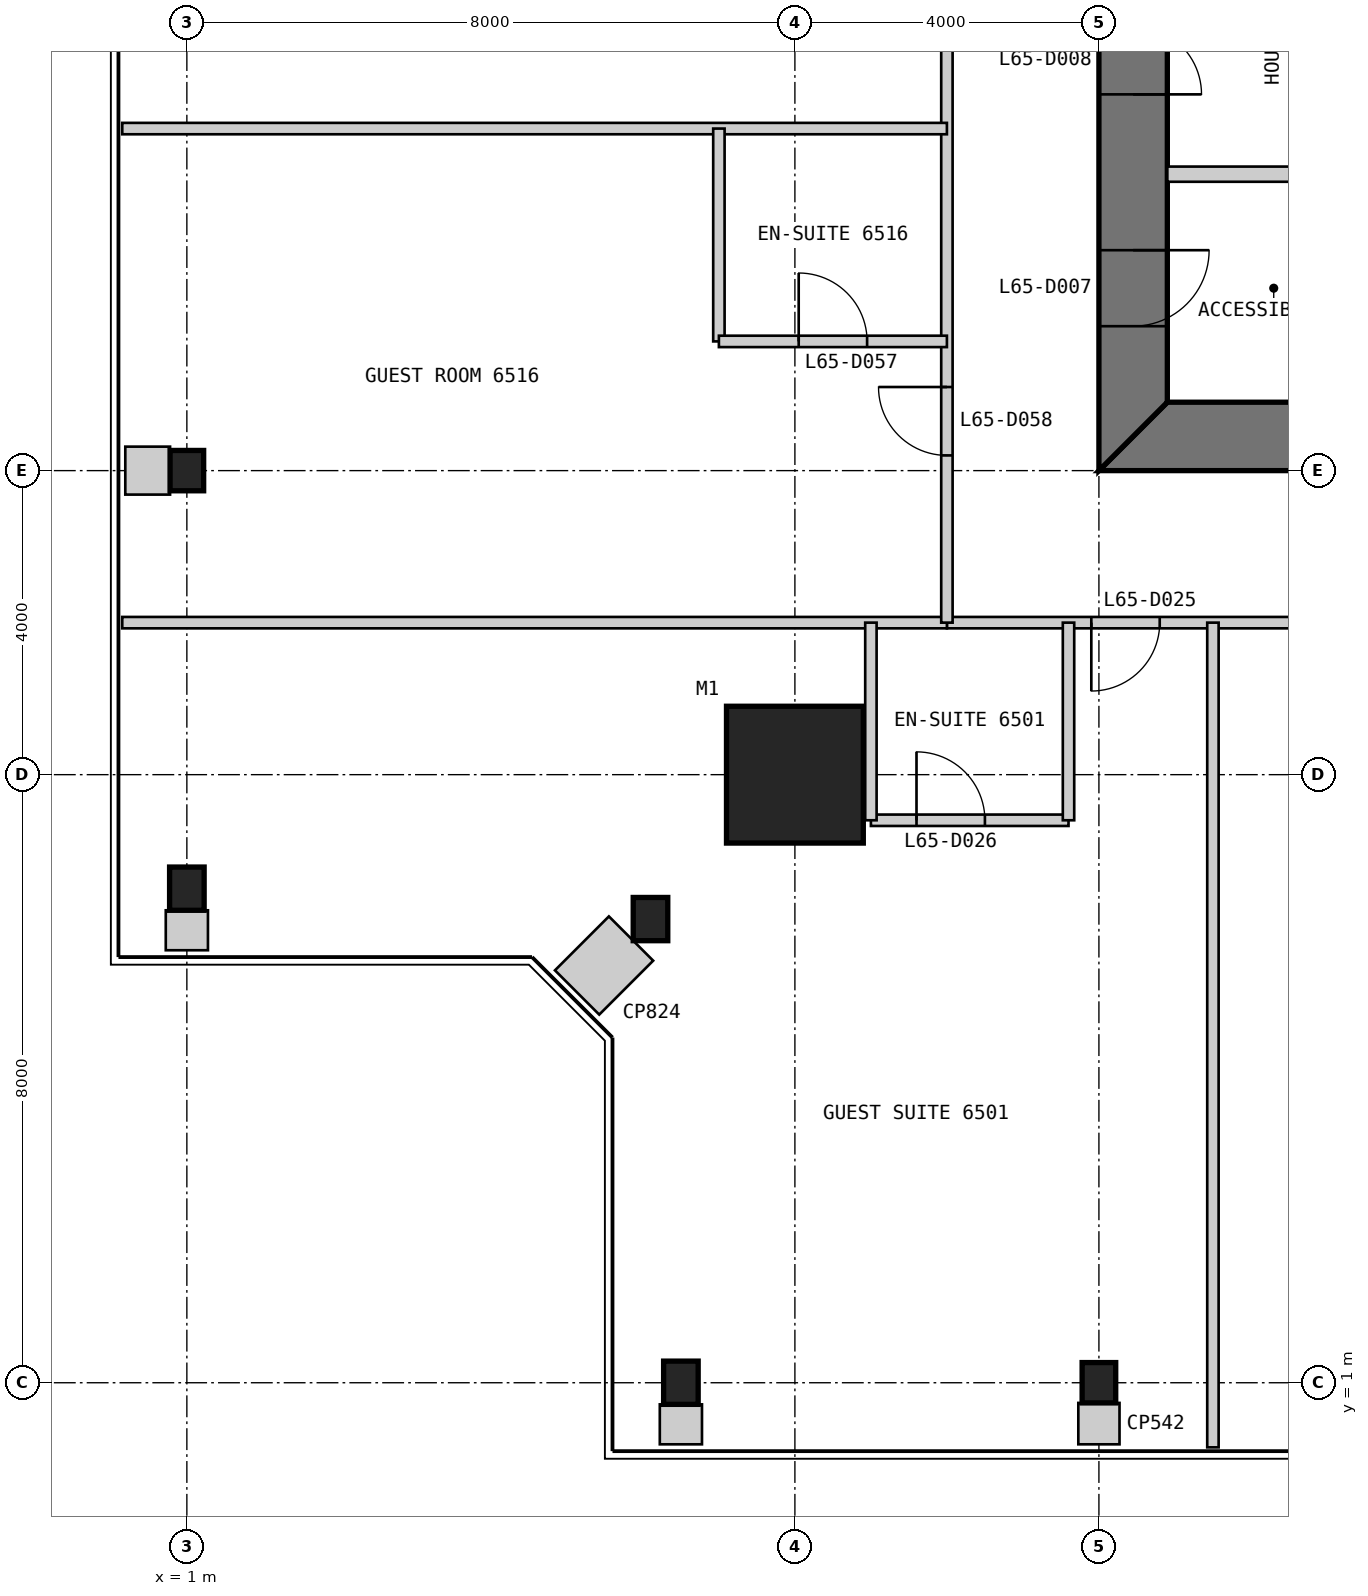
"""IFC4 building model, lengths in metres.
Left out: names, types, materials, properties, quantities, classifications, styles, units other than length and angle.
Written with IfcOpenShell. Run it as: python <this file> out.ifc"""

import sys

from ifc_helpers import new_model, si_unit, direction, frame, frame_2d, origin, origin_2d, place, context, subcontext, project, spatial, polyline, rectangle, i_section, outline, extrude, element, fill, save


model = new_model("IFC4")
c1 = context("Model", 3, precision=1e-05, world=origin(), true_north=direction((0.0, 1.0)))
c2 = subcontext(c1, "Body", "Model", "MODEL_VIEW")
j1 = project(units=[si_unit("LENGTHUNIT", "METRE"), si_unit("PLANEANGLEUNIT", "RADIAN")], contexts=[c1])
p1 = place(None, origin())
s1 = spatial("IfcSite", under=j1, at=p1, CompositionType="ELEMENT")
p2 = place(p1, origin())
s2 = spatial("IfcBuilding", under=s1, at=p2, CompositionType="ELEMENT")
p3 = place(p2, frame((0.0, 0.0, 273.0)))
s3 = spatial("IfcBuildingStorey", under=s2, at=p3, CompositionType="ELEMENT", Elevation=273.0)
p4 = place(p3, frame((9.0, 9.0, 0.0), z_axis=(0.0, 0.0, 1.0), x_axis=(1.0, 0.0, 0.0)))
e1 = element("IfcColumn", 1, at=p4, inside=s3, PredefinedType="COLUMN", context=c2, shape_type="SweptSolid", body=[
    extrude(rectangle(XDim=1.8, YDim=1.8, at=origin_2d()), origin(), (0.0, 0.0, 1.0), 3.4),
])
p5 = place(p3, frame((7.5, 1.0, 0.0), z_axis=(0.0, 0.0, 1.0), x_axis=(1.0, 0.0, 0.0)))
e2 = element("IfcColumn", 2, at=p5, inside=s3, PredefinedType="COLUMN", context=c2, shape_type="SweptSolid", body=[
    extrude(i_section(OverallWidth=0.455, OverallDepth=0.569, WebThickness=0.078, FlangeThickness=0.125, at=origin_2d()), origin(), (0.0, 0.0, 1.0), 3.4),
])
for number, where, z_axis, x_axis in (
    (3, (13.0, 1.0, 0.0), (0.0, 0.0, 1.0), (1.0, 0.0, 0.0)),
    (4, (1.0, 13.0, 0.0), (0.0, 0.0, 1.0), (1.0, 0.0, 0.0)),
):
    element("IfcColumn", number, at=place(p3, frame(where, z_axis=z_axis, x_axis=x_axis)), inside=s3, PredefinedType="COLUMN", context=c2, shape_type="SweptSolid", body=[
        extrude(i_section(OverallWidth=0.442, OverallDepth=0.531, WebThickness=0.066, FlangeThickness=0.106, at=origin_2d()), origin(), (0.0, 0.0, 1.0), 3.4),
    ])
for number, where, z_axis, x_axis in (
    (5, (1.0, 7.5, 0.0), (0.0, 0.0, 1.0), (1.0, 0.0, 0.0)),
    (6, (7.1, 7.1, 0.0), (0.0, 0.0, 1.0), (1.0, 0.0, 0.0)),
):
    element("IfcColumn", number, at=place(p3, frame(where, z_axis=z_axis, x_axis=x_axis)), inside=s3, PredefinedType="COLUMN", context=c2, shape_type="SweptSolid", body=[
        extrude(i_section(OverallWidth=0.455, OverallDepth=0.569, WebThickness=0.078, FlangeThickness=0.125, at=origin_2d()), origin(), (0.0, 0.0, 1.0), 3.4),
    ])
p6 = place(p3, frame((13.0, 13.45, 0.0), z_axis=(0.0, 0.0, 1.0), x_axis=(1.0, 0.0, 0.0)))
e7 = element("IfcWall", 7, at=p6, inside=s3, PredefinedType="SHEAR", context=c2, shape_type="SweptSolid", body=[
    extrude(outline(polyline([(0.0, -0.45), (24.0, -0.45), (23.1, 0.45), (0.9, 0.45), (0.0, -0.45)])), origin(), (0.0, 0.0, 1.0), 3.4),
])
p7 = place(p6, frame((4.9, 0.0, 0.0)))
e8 = element("IfcOpeningElement", 8, at=p7, cuts=e7, PredefinedType="OPENING", context=c2, shape_type="SweptSolid", body=[
    extrude(rectangle(XDim=1.0, YDim=2.2, at=frame_2d((0.5, 1.1))), frame((0.0, 0.46, 0.0), z_axis=(0.0, -1.0, 0.0), x_axis=(1.0, 0.0, 0.0)), (0.0, 0.0, 1.0), 0.92),
])
p8 = place(p6, frame((8.9, 0.0, 0.0)))
e9 = element("IfcOpeningElement", 9, at=p8, cuts=e7, PredefinedType="OPENING", context=c2, shape_type="SweptSolid", body=[
    extrude(rectangle(XDim=1.1, YDim=2.2, at=frame_2d((0.55, 1.1))), frame((0.0, 0.46, 0.0), z_axis=(0.0, -1.0, 0.0), x_axis=(1.0, 0.0, 0.0)), (0.0, 0.0, 1.0), 0.92),
])
p9 = place(p6, frame((15.05, 0.0, 0.0)))
e10 = element("IfcOpeningElement", 10, at=p9, cuts=e7, PredefinedType="OPENING", context=c2, shape_type="SweptSolid", body=[
    extrude(rectangle(XDim=0.9, YDim=2.2, at=frame_2d((0.45, 1.1))), frame((0.0, 0.46, 0.0), z_axis=(0.0, -1.0, 0.0), x_axis=(1.0, 0.0, 0.0)), (0.0, 0.0, 1.0), 0.92),
])
p10 = place(p6, frame((17.9, 0.0, 0.0)))
e11 = element("IfcOpeningElement", 11, at=p10, cuts=e7, PredefinedType="OPENING", context=c2, shape_type="SweptSolid", body=[
    extrude(rectangle(XDim=1.0, YDim=2.2, at=frame_2d((0.5, 1.1))), frame((0.0, 0.46, 0.0), z_axis=(0.0, -1.0, 0.0), x_axis=(1.0, 0.0, 0.0)), (0.0, 0.0, 1.0), 0.92),
])
p11 = place(p6, frame((21.4, 0.0, 0.0)))
e12 = element("IfcOpeningElement", 12, at=p11, cuts=e7, PredefinedType="OPENING", context=c2, shape_type="SweptSolid", body=[
    extrude(rectangle(XDim=1.0, YDim=2.2, at=frame_2d((0.5, 1.1))), frame((0.0, 0.46, 0.0), z_axis=(0.0, -1.0, 0.0), x_axis=(1.0, 0.0, 0.0)), (0.0, 0.0, 1.0), 0.92),
])
p12 = place(p3, frame((13.45, 36.1, 0.0), z_axis=(0.0, 0.0, 1.0), x_axis=(0.0, -1.0, 0.0)))
e13 = element("IfcWall", 13, at=p12, inside=s3, PredefinedType="SHEAR", context=c2, shape_type="SweptSolid", body=[
    extrude(outline(polyline([(-0.9, -0.45), (23.1, -0.45), (22.2, 0.45), (0.0, 0.45), (-0.9, -0.45)])), origin(), (0.0, 0.0, 1.0), 3.4),
])
p13 = place(p12, frame((20.2, 0.0, 0.0)))
e14 = element("IfcOpeningElement", 14, at=p13, cuts=e13, PredefinedType="OPENING", context=c2, shape_type="SweptSolid", body=[
    extrude(rectangle(XDim=1.0, YDim=2.2, at=frame_2d((0.5, 1.1))), frame((0.0, 0.46, 0.0), z_axis=(0.0, -1.0, 0.0), x_axis=(1.0, 0.0, 0.0)), (0.0, 0.0, 1.0), 0.92),
])
p14 = place(p12, frame((17.25, 0.0, 0.0)))
e15 = element("IfcOpeningElement", 15, at=p14, cuts=e13, PredefinedType="OPENING", context=c2, shape_type="SweptSolid", body=[
    extrude(rectangle(XDim=0.9, YDim=2.2, at=frame_2d((0.45, 1.1))), frame((0.0, 0.46, 0.0), z_axis=(0.0, -1.0, 0.0), x_axis=(1.0, 0.0, 0.0)), (0.0, 0.0, 1.0), 0.92),
])
p15 = place(p3, frame((13.9, 16.9, 0.0), z_axis=(0.0, 0.0, 1.0), x_axis=(1.0, 0.0, 0.0)))
e16 = element("IfcWall", 16, at=p15, inside=s3, PredefinedType="PARTITIONING", context=c2, shape_type="SweptSolid", body=[
    extrude(rectangle(XDim=2.8, YDim=0.2, at=frame_2d((1.4, 0.0))), origin(), (0.0, 0.0, 1.0), 3.2),
])
p16 = place(p3, frame((11.0, 11.0, 0.0), z_axis=(0.0, 0.0, 1.0), x_axis=(1.0, 0.0, 0.0)))
e17 = element("IfcWall", 17, at=p16, inside=s3, PredefinedType="PARTITIONING", context=c2, shape_type="SweptSolid", body=[
    extrude(rectangle(XDim=28.0, YDim=0.15, at=frame_2d((14.0, 0.0))), origin(), (0.0, 0.0, 1.0), 2.844),
])
p17 = place(p16, frame((1.9, 0.0, 0.0)))
e18 = element("IfcOpeningElement", 18, at=p17, cuts=e17, PredefinedType="OPENING", context=c2, shape_type="SweptSolid", body=[
    extrude(rectangle(XDim=0.9, YDim=2.1, at=frame_2d((0.45, 1.05))), frame((0.0, 0.085, 0.0), z_axis=(0.0, -1.0, 0.0), x_axis=(1.0, 0.0, 0.0)), (0.0, 0.0, 1.0), 0.17),
])
p18 = place(p16, frame((4.7, 0.0, 0.0)))
e19 = element("IfcOpeningElement", 19, at=p18, cuts=e17, PredefinedType="OPENING", context=c2, shape_type="SweptSolid", body=[
    extrude(rectangle(XDim=1.0, YDim=2.1, at=frame_2d((0.5, 1.05))), frame((0.0, 0.085, 0.0), z_axis=(0.0, -1.0, 0.0), x_axis=(1.0, 0.0, 0.0)), (0.0, 0.0, 1.0), 0.17),
])
p19 = place(p16, frame((13.3, 0.0, 0.0)))
e20 = element("IfcOpeningElement", 20, at=p19, cuts=e17, PredefinedType="OPENING", context=c2, shape_type="SweptSolid", body=[
    extrude(rectangle(XDim=0.9, YDim=2.1, at=frame_2d((0.45, 1.05))), frame((0.0, 0.085, 0.0), z_axis=(0.0, -1.0, 0.0), x_axis=(1.0, 0.0, 0.0)), (0.0, 0.0, 1.0), 0.17),
])
p20 = place(p16, frame((24.9, 0.0, 0.0)))
e21 = element("IfcOpeningElement", 21, at=p20, cuts=e17, PredefinedType="OPENING", context=c2, shape_type="SweptSolid", body=[
    extrude(rectangle(XDim=0.9, YDim=2.1, at=frame_2d((0.45, 1.05))), frame((0.0, 0.085, 0.0), z_axis=(0.0, -1.0, 0.0), x_axis=(1.0, 0.0, 0.0)), (0.0, 0.0, 1.0), 0.17),
])
p21 = place(p3, frame((0.15, 11.0, 0.0), z_axis=(0.0, 0.0, 1.0), x_axis=(1.0, 0.0, 0.0)))
e22 = element("IfcWall", 22, at=p21, inside=s3, PredefinedType="PARTITIONING", context=c2, shape_type="SweptSolid", body=[
    extrude(rectangle(XDim=10.85, YDim=0.15, at=frame_2d((5.425, 0.0))), origin(), (0.0, 0.0, 1.0), 2.844),
])
p22 = place(p3, frame((10.0, 8.4, 0.0), z_axis=(0.0, 0.0, 1.0), x_axis=(1.0, 0.0, 0.0)))
e23 = element("IfcWall", 23, at=p22, inside=s3, PredefinedType="PARTITIONING", context=c2, shape_type="SweptSolid", body=[
    extrude(rectangle(XDim=2.6, YDim=0.15, at=frame_2d((1.3, 0.0))), origin(), (0.0, 0.0, 1.0), 3.25),
])
p23 = place(p22, frame((0.6, 0.0, 0.0)))
e24 = element("IfcOpeningElement", 24, at=p23, cuts=e23, PredefinedType="OPENING", context=c2, shape_type="SweptSolid", body=[
    extrude(rectangle(XDim=0.9, YDim=2.1, at=frame_2d((0.45, 1.05))), frame((0.0, 0.085, 0.0), z_axis=(0.0, -1.0, 0.0), x_axis=(1.0, 0.0, 0.0)), (0.0, 0.0, 1.0), 0.17),
])
for number, where, z_axis, x_axis in (
    (25, (10.0, 8.4, 0.0), (0.0, 0.0, 1.0), (0.0, 1.0, 0.0)),
    (26, (12.6, 8.4, 0.0), (0.0, 0.0, 1.0), (0.0, 1.0, 0.0)),
):
    element("IfcWall", number, at=place(p3, frame(where, z_axis=z_axis, x_axis=x_axis)), inside=s3, PredefinedType="PARTITIONING", context=c2, shape_type="SweptSolid", body=[
        extrude(rectangle(XDim=2.6, YDim=0.15, at=frame_2d((1.3, 0.0))), origin(), (0.0, 0.0, 1.0), 3.25),
    ])
p24 = place(p3, frame((14.5, 0.15, 0.0), z_axis=(0.0, 0.0, 1.0), x_axis=(0.0, 1.0, 0.0)))
e27 = element("IfcWall", 27, at=p24, inside=s3, PredefinedType="PARTITIONING", context=c2, shape_type="SweptSolid", body=[
    extrude(rectangle(XDim=10.85, YDim=0.15, at=frame_2d((5.425, 0.0))), origin(), (0.0, 0.0, 1.0), 3.25),
])
p25 = place(p3, frame((11.0, 39.0, 0.0), z_axis=(0.0, 0.0, 1.0), x_axis=(0.0, -1.0, 0.0)))
e28 = element("IfcWall", 28, at=p25, inside=s3, PredefinedType="PARTITIONING", context=c2, shape_type="SweptSolid", body=[
    extrude(rectangle(XDim=28.0, YDim=0.15, at=frame_2d((14.0, 0.0))), origin(), (0.0, 0.0, 1.0), 2.844),
])
p26 = place(p25, frame((2.075, 0.0, 0.0)))
e29 = element("IfcOpeningElement", 29, at=p26, cuts=e28, PredefinedType="OPENING", context=c2, shape_type="SweptSolid", body=[
    extrude(rectangle(XDim=0.9, YDim=2.1, at=frame_2d((0.45, 1.05))), frame((0.0, 0.085, 0.0), z_axis=(0.0, -1.0, 0.0), x_axis=(1.0, 0.0, 0.0)), (0.0, 0.0, 1.0), 0.17),
])
p27 = place(p25, frame((5.2, 0.0, 0.0)))
e30 = element("IfcOpeningElement", 30, at=p27, cuts=e28, PredefinedType="OPENING", context=c2, shape_type="SweptSolid", body=[
    extrude(rectangle(XDim=0.9, YDim=2.1, at=frame_2d((0.45, 1.05))), frame((0.0, 0.085, 0.0), z_axis=(0.0, -1.0, 0.0), x_axis=(1.0, 0.0, 0.0)), (0.0, 0.0, 1.0), 0.17),
])
p28 = place(p25, frame((13.3, 0.0, 0.0)))
e31 = element("IfcOpeningElement", 31, at=p28, cuts=e28, PredefinedType="OPENING", context=c2, shape_type="SweptSolid", body=[
    extrude(rectangle(XDim=0.9, YDim=2.1, at=frame_2d((0.45, 1.05))), frame((0.0, 0.085, 0.0), z_axis=(0.0, -1.0, 0.0), x_axis=(1.0, 0.0, 0.0)), (0.0, 0.0, 1.0), 0.17),
])
p29 = place(p25, frame((24.9, 0.0, 0.0)))
e32 = element("IfcOpeningElement", 32, at=p29, cuts=e28, PredefinedType="OPENING", context=c2, shape_type="SweptSolid", body=[
    extrude(rectangle(XDim=0.9, YDim=2.1, at=frame_2d((0.45, 1.05))), frame((0.0, 0.085, 0.0), z_axis=(0.0, -1.0, 0.0), x_axis=(1.0, 0.0, 0.0)), (0.0, 0.0, 1.0), 0.17),
])
p30 = place(p3, frame((0.15, 17.5, 0.0), z_axis=(0.0, 0.0, 1.0), x_axis=(1.0, 0.0, 0.0)))
e33 = element("IfcWall", 33, at=p30, inside=s3, PredefinedType="PARTITIONING", context=c2, shape_type="SweptSolid", body=[
    extrude(rectangle(XDim=10.85, YDim=0.15, at=frame_2d((5.425, 0.0))), origin(), (0.0, 0.0, 1.0), 3.25),
])
p31 = place(p3, frame((8.0, 17.5, 0.0), z_axis=(0.0, 0.0, 1.0), x_axis=(0.0, -1.0, 0.0)))
e34 = element("IfcWall", 34, at=p31, inside=s3, PredefinedType="PARTITIONING", context=c2, shape_type="SweptSolid", body=[
    extrude(rectangle(XDim=2.8, YDim=0.15, at=frame_2d((1.4, 0.0))), origin(), (0.0, 0.0, 1.0), 3.25),
])
p32 = place(p3, frame((8.0, 14.7, 0.0), z_axis=(0.0, 0.0, 1.0), x_axis=(1.0, 0.0, 0.0)))
e35 = element("IfcWall", 35, at=p32, inside=s3, PredefinedType="PARTITIONING", context=c2, shape_type="SweptSolid", body=[
    extrude(rectangle(XDim=3.0, YDim=0.15, at=frame_2d((1.5, 0.0))), origin(), (0.0, 0.0, 1.0), 3.25),
])
p33 = place(p32, frame((1.05, 0.0, 0.0)))
e36 = element("IfcOpeningElement", 36, at=p33, cuts=e35, PredefinedType="OPENING", context=c2, shape_type="SweptSolid", body=[
    extrude(rectangle(XDim=0.9, YDim=2.1, at=frame_2d((0.45, 1.05))), frame((0.0, 0.085, 0.0), z_axis=(0.0, -1.0, 0.0), x_axis=(1.0, 0.0, 0.0)), (0.0, 0.0, 1.0), 0.17),
])
p34 = place(p3, frame((7.5, 0.19, 0.0), z_axis=(0.0, 0.0, 1.0), x_axis=(0.0, 1.0, 0.0)))
e37 = element("IfcWall", 37, at=p34, inside=s3, PredefinedType="PARTITIONING", context=c2, shape_type="SweptSolid", body=[
    extrude(rectangle(XDim=0.526, YDim=0.555, at=frame_2d((0.263, 0.0))), origin(), (0.0, 0.0, 1.0), 3.25),
])
p35 = place(p3, frame((13.0, 0.19, 0.0), z_axis=(0.0, 0.0, 1.0), x_axis=(0.0, 1.0, 0.0)))
e38 = element("IfcWall", 38, at=p35, inside=s3, PredefinedType="PARTITIONING", context=c2, shape_type="SweptSolid", body=[
    extrude(rectangle(XDim=0.545, YDim=0.542, at=frame_2d((0.272, 0.0))), origin(), (0.0, 0.0, 1.0), 3.25),
])
p36 = place(p3, frame((1.0, 6.69, 0.0), z_axis=(0.0, 0.0, 1.0), x_axis=(0.0, 1.0, 0.0)))
e39 = element("IfcWall", 39, at=p36, inside=s3, PredefinedType="PARTITIONING", context=c2, shape_type="SweptSolid", body=[
    extrude(rectangle(XDim=0.526, YDim=0.555, at=frame_2d((0.263, 0.0))), origin(), (0.0, 0.0, 1.0), 3.25),
])
p37 = place(p3, frame((6.134, 6.134, 0.0), z_axis=(0.0, 0.0, 1.0), x_axis=(0.707106781187, 0.707106781187, 0.0)))
e40 = element("IfcWall", 40, at=p37, inside=s3, PredefinedType="PARTITIONING", context=c2, shape_type="SweptSolid", body=[
    extrude(rectangle(XDim=1.004, YDim=0.824, at=frame_2d((0.502, 0.0))), origin(), (0.0, 0.0, 1.0), 3.25),
])
p38 = place(p3, frame((0.19, 13.0, 0.0), z_axis=(0.0, 0.0, 1.0), x_axis=(1.0, 0.0, 0.0)))
e41 = element("IfcWall", 41, at=p38, inside=s3, PredefinedType="PARTITIONING", context=c2, shape_type="SweptSolid", body=[
    extrude(rectangle(XDim=0.589, YDim=0.631, at=frame_2d((0.294, 0.0))), origin(), (0.0, 0.0, 1.0), 3.25),
])
p39 = place(p13, origin())
e42 = element("IfcDoor", 42, at=p39, inside=s3, OperationType="SINGLE_SWING_LEFT", PredefinedType="DOOR", context=c2, shape_type="SweptSolid", body=[
    extrude(rectangle(XDim=1.0, YDim=2.2, at=frame_2d((0.5, 1.1))), frame((0.0, 0.025, 0.0), z_axis=(0.0, -1.0, 0.0), x_axis=(1.0, 0.0, 0.0)), (0.0, 0.0, 1.0), 0.05),
    extrude(outline(polyline([(0.0, 0.0), (0.04, 0.0), (0.04, 2.16), (0.96, 2.16), (0.96, 0.0), (1.0, 0.0), (1.0, 2.2), (0.0, 2.2), (0.0, 0.0)])), frame((0.0, 0.3, 0.0), z_axis=(0.0, -1.0, 0.0), x_axis=(1.0, 0.0, 0.0)), (0.0, 0.0, 1.0), 0.6),
])
fill(e14, e42)
p40 = place(p14, origin())
e43 = element("IfcDoor", 43, at=p40, inside=s3, OperationType="SINGLE_SWING_RIGHT", PredefinedType="DOOR", context=c2, shape_type="SweptSolid", body=[
    extrude(rectangle(XDim=0.9, YDim=2.2, at=frame_2d((0.45, 1.1))), frame((0.0, 0.025, 0.0), z_axis=(0.0, -1.0, 0.0), x_axis=(1.0, 0.0, 0.0)), (0.0, 0.0, 1.0), 0.05),
    extrude(outline(polyline([(0.0, 0.0), (0.04, 0.0), (0.04, 2.16), (0.86, 2.16), (0.86, 0.0), (0.9, 0.0), (0.9, 2.2), (0.0, 2.2), (0.0, 0.0)])), frame((0.0, 0.3, 0.0), z_axis=(0.0, -1.0, 0.0), x_axis=(1.0, 0.0, 0.0)), (0.0, 0.0, 1.0), 0.6),
])
fill(e15, e43)
p41 = place(p17, frame((0.9, 0.0, 0.0), z_axis=(0.0, 0.0, 1.0), x_axis=(-1.0, 0.0, 0.0)))
e44 = element("IfcDoor", 44, at=p41, inside=s3, OperationType="SINGLE_SWING_RIGHT", PredefinedType="DOOR", context=c2, shape_type="SweptSolid", body=[
    extrude(rectangle(XDim=0.9, YDim=2.1, at=frame_2d((0.45, 1.05))), frame((0.0, 0.025, 0.0), z_axis=(0.0, -1.0, 0.0), x_axis=(1.0, 0.0, 0.0)), (0.0, 0.0, 1.0), 0.05),
])
fill(e18, e44)
p42 = place(p23, origin())
e45 = element("IfcDoor", 45, at=p42, inside=s3, OperationType="SINGLE_SWING_LEFT", PredefinedType="DOOR", context=c2, shape_type="SweptSolid", body=[
    extrude(rectangle(XDim=0.9, YDim=2.1, at=frame_2d((0.45, 1.05))), frame((0.0, 0.025, 0.0), z_axis=(0.0, -1.0, 0.0), x_axis=(1.0, 0.0, 0.0)), (0.0, 0.0, 1.0), 0.05),
])
fill(e24, e45)
p43 = place(p33, origin())
e46 = element("IfcDoor", 46, at=p43, inside=s3, OperationType="SINGLE_SWING_LEFT", PredefinedType="DOOR", context=c2, shape_type="SweptSolid", body=[
    extrude(rectangle(XDim=0.9, YDim=2.1, at=frame_2d((0.45, 1.05))), frame((0.0, 0.025, 0.0), z_axis=(0.0, -1.0, 0.0), x_axis=(1.0, 0.0, 0.0)), (0.0, 0.0, 1.0), 0.05),
])
fill(e36, e46)
p44 = place(p29, frame((0.9, 0.0, 0.0), z_axis=(0.0, 0.0, 1.0), x_axis=(-1.0, 0.0, 0.0)))
e47 = element("IfcDoor", 47, at=p44, inside=s3, OperationType="SINGLE_SWING_RIGHT", PredefinedType="DOOR", context=c2, shape_type="SweptSolid", body=[
    extrude(rectangle(XDim=0.9, YDim=2.1, at=frame_2d((0.45, 1.05))), frame((0.0, 0.025, 0.0), z_axis=(0.0, -1.0, 0.0), x_axis=(1.0, 0.0, 0.0)), (0.0, 0.0, 1.0), 0.05),
])
fill(e32, e47)
save(model, sys.argv[1])
